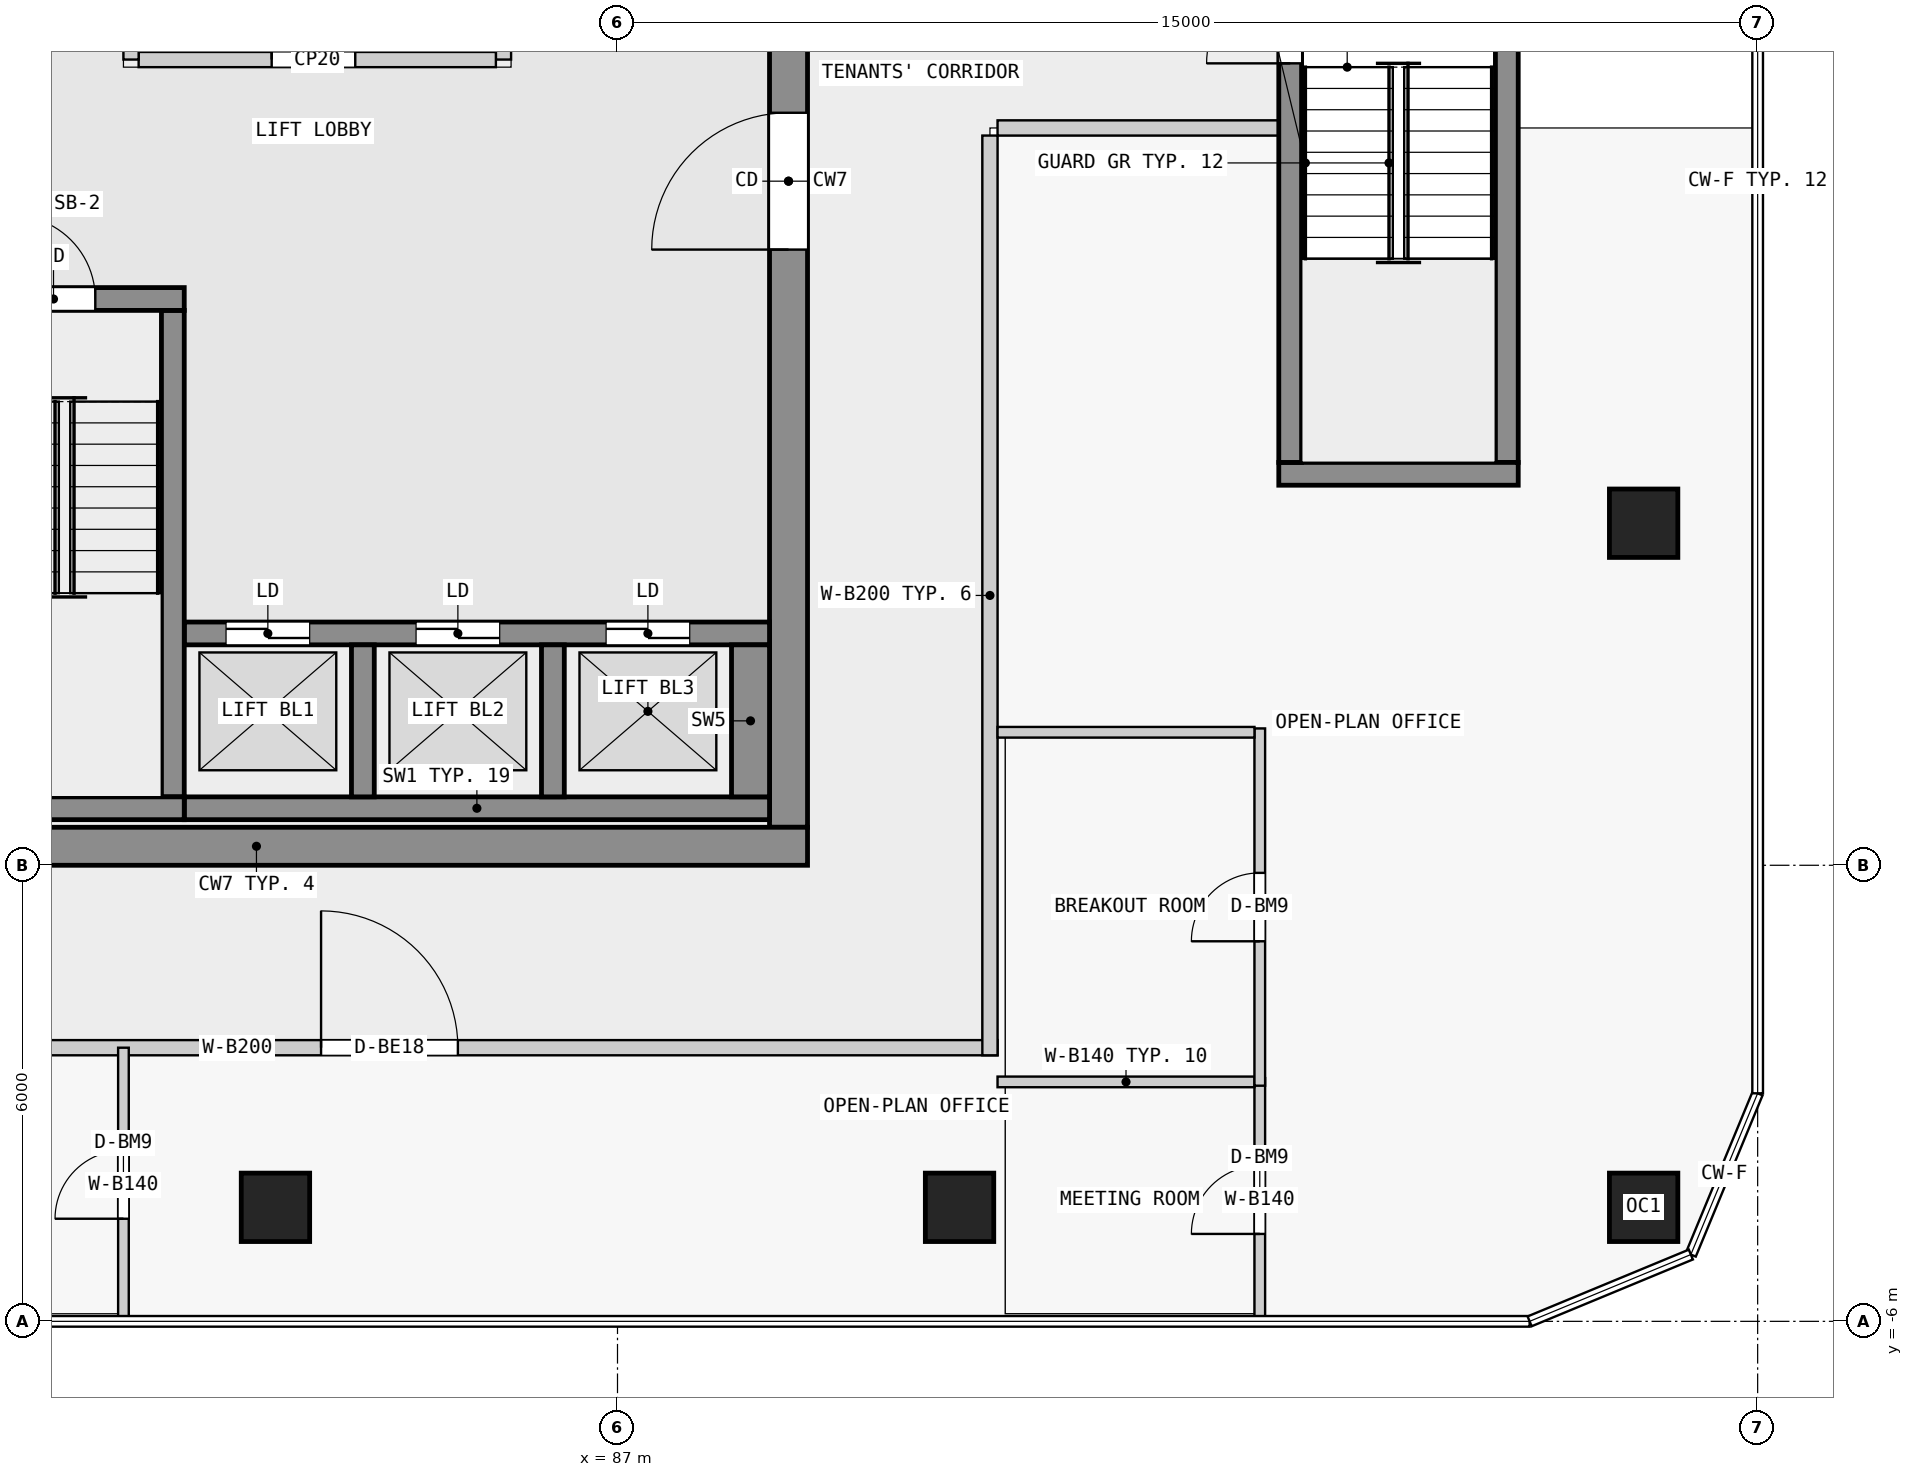
"""IFC4 building model, lengths in metres.
Left out: names, types, materials, properties, quantities, classifications, styles, units other than length and angle.
Written with IfcOpenShell. Run it as: python <this file> out.ifc"""

import sys

from ifc_helpers import new_model, si_unit, direction, frame, frame_2d, origin, origin_2d, place, context, subcontext, project, spatial, rectangle, extrude, element, fill, save


model = new_model("IFC4")
c1 = context("Model", 3, precision=1e-05, world=origin(), true_north=direction((0.0, 1.0)))
c2 = subcontext(c1, "Body", "Model", "MODEL_VIEW")
j1 = project(units=[si_unit("LENGTHUNIT", "METRE"), si_unit("PLANEANGLEUNIT", "RADIAN")], contexts=[c1])
p1 = place(None, origin())
s1 = spatial("IfcSite", under=j1, at=p1, CompositionType="ELEMENT")
p2 = place(p1, origin())
s2 = spatial("IfcBuilding", under=s1, at=p2, CompositionType="ELEMENT")
p3 = place(p2, frame((0.0, 0.0, 44.3)))
s3 = spatial("IfcBuildingStorey", under=s2, at=p3, CompositionType="ELEMENT", Elevation=44.3)
for number, where, z_axis, x_axis in (
    (1, (82.5, -4.5, 0.0), (0.0, 0.0, 1.0), (1.0, 0.0, 0.0)),
    (2, (91.5, -4.5, 0.0), (0.0, 0.0, 1.0), (1.0, 0.0, 0.0)),
    (3, (100.5, -4.5, 0.0), (0.0, 0.0, 1.0), (1.0, 0.0, 0.0)),
    (4, (100.5, 4.5, 0.0), (0.0, 0.0, 1.0), (1.0, 0.0, 0.0)),
):
    element("IfcColumn", number, at=place(p3, frame(where, z_axis=z_axis, x_axis=x_axis)), inside=s3, PredefinedType="COLUMN", context=c2, shape_type="SweptSolid", body=[
        extrude(rectangle(XDim=0.9, YDim=0.9, at=origin_2d()), origin(), (0.0, 0.0, 1.0), 3.5),
    ])
p4 = place(p3, frame((75.0, 0.25, 0.0), z_axis=(0.0, 0.0, 1.0), x_axis=(1.0, 0.0, 0.0)))
e5 = element("IfcWall", 5, at=p4, inside=s3, PredefinedType="SHEAR", context=c2, shape_type="SweptSolid", body=[
    extrude(rectangle(XDim=14.5, YDim=0.5, at=frame_2d((7.25, 0.0))), origin(), (0.0, 0.0, 1.0), 3.25),
])
p5 = place(p3, frame((89.25, 0.5, 0.0), z_axis=(0.0, 0.0, 1.0), x_axis=(0.0, 1.0, 0.0)))
e6 = element("IfcWall", 6, at=p5, inside=s3, PredefinedType="SHEAR", context=c2, shape_type="SweptSolid", body=[
    extrude(rectangle(XDim=17.0, YDim=0.5, at=frame_2d((8.5, 0.0))), origin(), (0.0, 0.0, 1.0), 3.25),
])
p6 = place(p5, frame((7.6, 0.0, 0.0)))
e7 = element("IfcOpeningElement", 7, at=p6, cuts=e6, PredefinedType="OPENING", context=c2, shape_type="SweptSolid", body=[
    extrude(rectangle(XDim=1.8, YDim=2.1, at=frame_2d((0.9, 1.05))), frame((0.0, 0.26, 0.0), z_axis=(0.0, -1.0, 0.0), x_axis=(1.0, 0.0, 0.0)), (0.0, 0.0, 1.0), 0.52),
])
p7 = place(p3, frame((75.48, 0.75, 0.0), z_axis=(0.0, 0.0, 1.0), x_axis=(1.0, 0.0, 0.0)))
e8 = element("IfcWall", 8, at=p7, inside=s3, PredefinedType="SHEAR", context=c2, shape_type="SweptSolid", body=[
    extrude(rectangle(XDim=5.82, YDim=0.3, at=frame_2d((2.91, 0.0))), origin(), (0.0, 0.0, 1.0), 3.25),
])
p8 = place(p3, frame((75.48, 7.45, 0.0), z_axis=(0.0, 0.0, 1.0), x_axis=(1.0, 0.0, 0.0)))
e9 = element("IfcWall", 9, at=p8, inside=s3, PredefinedType="SHEAR", context=c2, shape_type="SweptSolid", body=[
    extrude(rectangle(XDim=5.82, YDim=0.3, at=frame_2d((2.91, 0.0))), origin(), (0.0, 0.0, 1.0), 3.25),
])
p9 = place(p8, frame((0.75, 0.0, 0.0)))
e10 = element("IfcOpeningElement", 10, at=p9, cuts=e9, PredefinedType="OPENING", context=c2, shape_type="SweptSolid", body=[
    extrude(rectangle(XDim=1.1, YDim=2.1, at=frame_2d((0.55, 1.05))), frame((0.0, 0.16, 0.0), z_axis=(0.0, -1.0, 0.0), x_axis=(1.0, 0.0, 0.0)), (0.0, 0.0, 1.0), 0.32),
])
p10 = place(p8, frame((3.55, 0.0, 0.0)))
e11 = element("IfcOpeningElement", 11, at=p10, cuts=e9, PredefinedType="OPENING", context=c2, shape_type="SweptSolid", body=[
    extrude(rectangle(XDim=1.1, YDim=2.1, at=frame_2d((0.55, 1.05))), frame((0.0, 0.16, 0.0), z_axis=(0.0, -1.0, 0.0), x_axis=(1.0, 0.0, 0.0)), (0.0, 0.0, 1.0), 0.32),
])
p11 = place(p3, frame((81.15, 0.9, 0.0), z_axis=(0.0, 0.0, 1.0), x_axis=(0.0, 1.0, 0.0)))
e12 = element("IfcWall", 12, at=p11, inside=s3, PredefinedType="SHEAR", context=c2, shape_type="SweptSolid", body=[
    extrude(rectangle(XDim=6.4, YDim=0.3, at=frame_2d((3.2, 0.0))), origin(), (0.0, 0.0, 1.0), 3.25),
])
p12 = place(p3, frame((81.3, 0.75, 0.0), z_axis=(0.0, 0.0, 1.0), x_axis=(1.0, 0.0, 0.0)))
e13 = element("IfcWall", 13, at=p12, inside=s3, PredefinedType="SHEAR", context=c2, shape_type="SweptSolid", body=[
    extrude(rectangle(XDim=7.7, YDim=0.3, at=frame_2d((3.85, 0.0))), origin(), (0.0, 0.0, 1.0), 3.25),
])
for number, where, z_axis, x_axis in (
    (14, (83.65, 0.9, 0.0), (0.0, 0.0, 1.0), (0.0, 1.0, 0.0)),
    (15, (86.15, 0.9, 0.0), (0.0, 0.0, 1.0), (0.0, 1.0, 0.0)),
):
    element("IfcWall", number, at=place(p3, frame(where, z_axis=z_axis, x_axis=x_axis)), inside=s3, PredefinedType="SHEAR", context=c2, shape_type="SweptSolid", body=[
        extrude(rectangle(XDim=2.0, YDim=0.3, at=frame_2d((1.0, 0.0))), origin(), (0.0, 0.0, 1.0), 3.25),
    ])
p13 = place(p3, frame((88.75, 0.9, 0.0), z_axis=(0.0, 0.0, 1.0), x_axis=(0.0, 1.0, 0.0)))
e16 = element("IfcWall", 16, at=p13, inside=s3, PredefinedType="SHEAR", context=c2, shape_type="SweptSolid", body=[
    extrude(rectangle(XDim=2.0, YDim=0.5, at=frame_2d((1.0, 0.0))), origin(), (0.0, 0.0, 1.0), 3.25),
])
p14 = place(p3, frame((81.3, 3.05, 0.0), z_axis=(0.0, 0.0, 1.0), x_axis=(1.0, 0.0, 0.0)))
e17 = element("IfcWall", 17, at=p14, inside=s3, PredefinedType="SHEAR", context=c2, shape_type="SweptSolid", body=[
    extrude(rectangle(XDim=7.7, YDim=0.3, at=frame_2d((3.85, 0.0))), origin(), (0.0, 0.0, 1.0), 3.25),
])
p15 = place(p14, frame((0.55, 0.0, 0.0)))
e18 = element("IfcOpeningElement", 18, at=p15, cuts=e17, PredefinedType="OPENING", context=c2, shape_type="SweptSolid", body=[
    extrude(rectangle(XDim=1.1, YDim=2.1, at=frame_2d((0.55, 1.05))), frame((0.0, 0.16, 0.0), z_axis=(0.0, -1.0, 0.0), x_axis=(1.0, 0.0, 0.0)), (0.0, 0.0, 1.0), 0.32),
])
p16 = place(p14, frame((3.05, 0.0, 0.0)))
e19 = element("IfcOpeningElement", 19, at=p16, cuts=e17, PredefinedType="OPENING", context=c2, shape_type="SweptSolid", body=[
    extrude(rectangle(XDim=1.1, YDim=2.1, at=frame_2d((0.55, 1.05))), frame((0.0, 0.16, 0.0), z_axis=(0.0, -1.0, 0.0), x_axis=(1.0, 0.0, 0.0)), (0.0, 0.0, 1.0), 0.32),
])
p17 = place(p14, frame((5.55, 0.0, 0.0)))
e20 = element("IfcOpeningElement", 20, at=p17, cuts=e17, PredefinedType="OPENING", context=c2, shape_type="SweptSolid", body=[
    extrude(rectangle(XDim=1.1, YDim=2.1, at=frame_2d((0.55, 1.05))), frame((0.0, 0.16, 0.0), z_axis=(0.0, -1.0, 0.0), x_axis=(1.0, 0.0, 0.0)), (0.0, 0.0, 1.0), 0.32),
])
p18 = place(p3, frame((95.85, 5.3, 0.0), z_axis=(0.0, 0.0, 1.0), x_axis=(0.0, 1.0, 0.0)))
e21 = element("IfcWall", 21, at=p18, inside=s3, PredefinedType="SHEAR", context=c2, shape_type="SweptSolid", body=[
    extrude(rectangle(XDim=6.4, YDim=0.3, at=frame_2d((3.2, 0.0))), origin(), (0.0, 0.0, 1.0), 3.25),
])
p19 = place(p18, frame((5.25, 0.0, 0.0)))
e22 = element("IfcOpeningElement", 22, at=p19, cuts=e21, PredefinedType="OPENING", context=c2, shape_type="SweptSolid", body=[
    extrude(rectangle(XDim=1.1, YDim=2.1, at=frame_2d((0.55, 1.05))), frame((0.0, 0.16, 0.0), z_axis=(0.0, -1.0, 0.0), x_axis=(1.0, 0.0, 0.0)), (0.0, 0.0, 1.0), 0.32),
])
p20 = place(p3, frame((98.7, 5.3, 0.0), z_axis=(0.0, 0.0, 1.0), x_axis=(0.0, 1.0, 0.0)))
e23 = element("IfcWall", 23, at=p20, inside=s3, PredefinedType="SHEAR", context=c2, shape_type="SweptSolid", body=[
    extrude(rectangle(XDim=6.4, YDim=0.3, at=frame_2d((3.2, 0.0))), origin(), (0.0, 0.0, 1.0), 3.25),
])
p21 = place(p3, frame((95.7, 5.15, 0.0), z_axis=(0.0, 0.0, 1.0), x_axis=(1.0, 0.0, 0.0)))
e24 = element("IfcWall", 24, at=p21, inside=s3, PredefinedType="SHEAR", context=c2, shape_type="SweptSolid", body=[
    extrude(rectangle(XDim=3.15, YDim=0.3, at=frame_2d((1.575, 0.0))), origin(), (0.0, 0.0, 1.0), 3.25),
])
p22 = place(p3, frame((80.6, 10.6, 0.0), z_axis=(0.0, 0.0, 1.0), x_axis=(0.0, 1.0, 0.0)))
e25 = element("IfcWall", 25, at=p22, inside=s3, PredefinedType="PARTITIONING", context=c2, shape_type="SweptSolid", body=[
    extrude(rectangle(XDim=3.4, YDim=0.2, at=frame_2d((1.7, 0.0))), origin(), (0.0, 0.0, 1.0), 3.25),
])
p23 = place(p3, frame((80.7, 10.6, 0.0), z_axis=(0.0, 0.0, 1.0), x_axis=(1.0, 0.0, 0.0)))
e26 = element("IfcWall", 26, at=p23, inside=s3, PredefinedType="PARTITIONING", context=c2, shape_type="SweptSolid", body=[
    extrude(rectangle(XDim=4.7, YDim=0.2, at=frame_2d((2.35, 0.0))), origin(), (0.0, 0.0, 1.0), 3.25),
])
p24 = place(p23, frame((1.75, 0.0, 0.0)))
e27 = element("IfcOpeningElement", 27, at=p24, cuts=e26, PredefinedType="OPENING", context=c2, shape_type="SweptSolid", body=[
    extrude(rectangle(XDim=1.1, YDim=2.1, at=frame_2d((0.55, 1.05))), frame((0.0, 0.11, 0.0), z_axis=(0.0, -1.0, 0.0), x_axis=(1.0, 0.0, 0.0)), (0.0, 0.0, 1.0), 0.22),
])
p25 = place(p3, frame((85.5, 10.6, 0.0), z_axis=(0.0, 0.0, 1.0), x_axis=(0.0, 1.0, 0.0)))
e28 = element("IfcWall", 28, at=p25, inside=s3, PredefinedType="PARTITIONING", context=c2, shape_type="SweptSolid", body=[
    extrude(rectangle(XDim=3.4, YDim=0.2, at=frame_2d((1.7, 0.0))), origin(), (0.0, 0.0, 1.0), 3.25),
])
p26 = place(p3, frame((72.0, -2.4, 0.0), z_axis=(0.0, 0.0, 1.0), x_axis=(1.0, 0.0, 0.0)))
e29 = element("IfcWall", 29, at=p26, inside=s3, PredefinedType="PARTITIONING", context=c2, shape_type="SweptSolid", body=[
    extrude(rectangle(XDim=20.0, YDim=0.2, at=frame_2d((10.0, 0.0))), origin(), (0.0, 0.0, 1.0), 3.25),
])
p27 = place(p26, frame((11.1, 0.0, 0.0)))
e30 = element("IfcOpeningElement", 30, at=p27, cuts=e29, PredefinedType="OPENING", context=c2, shape_type="SweptSolid", body=[
    extrude(rectangle(XDim=1.8, YDim=2.1, at=frame_2d((0.9, 1.05))), frame((0.0, 0.11, 0.0), z_axis=(0.0, -1.0, 0.0), x_axis=(1.0, 0.0, 0.0)), (0.0, 0.0, 1.0), 0.22),
])
p28 = place(p3, frame((91.9, -2.5, 0.0), z_axis=(0.0, 0.0, 1.0), x_axis=(0.0, 1.0, 0.0)))
e31 = element("IfcWall", 31, at=p28, inside=s3, PredefinedType="PARTITIONING", context=c2, shape_type="SweptSolid", body=[
    extrude(rectangle(XDim=12.1, YDim=0.2, at=frame_2d((6.05, 0.0))), origin(), (0.0, 0.0, 1.0), 3.25),
])
p29 = place(p3, frame((92.0, 9.7, 0.0), z_axis=(0.0, 0.0, 1.0), x_axis=(1.0, 0.0, 0.0)))
e32 = element("IfcWall", 32, at=p29, inside=s3, PredefinedType="PARTITIONING", context=c2, shape_type="SweptSolid", body=[
    extrude(rectangle(XDim=3.7, YDim=0.2, at=frame_2d((1.85, 0.0))), origin(), (0.0, 0.0, 1.0), 3.25),
])
p30 = place(p3, frame((80.5, -6.0, 0.0), z_axis=(0.0, 0.0, 1.0), x_axis=(0.0, 1.0, 0.0)))
e33 = element("IfcWall", 33, at=p30, inside=s3, PredefinedType="PARTITIONING", context=c2, shape_type="SweptSolid", body=[
    extrude(rectangle(XDim=3.6, YDim=0.14, at=frame_2d((1.8, 0.0))), origin(), (0.0, 0.0, 1.0), 3.25),
])
p31 = place(p30, frame((1.35, 0.0, 0.0)))
e34 = element("IfcOpeningElement", 34, at=p31, cuts=e33, PredefinedType="OPENING", context=c2, shape_type="SweptSolid", body=[
    extrude(rectangle(XDim=0.9, YDim=2.4, at=frame_2d((0.45, 1.2))), frame((0.0, 0.08, 0.0), z_axis=(0.0, -1.0, 0.0), x_axis=(1.0, 0.0, 0.0)), (0.0, 0.0, 1.0), 0.16),
])
p32 = place(p3, frame((95.45, -6.0, 0.0), z_axis=(0.0, 0.0, 1.0), x_axis=(0.0, 1.0, 0.0)))
e35 = element("IfcWall", 35, at=p32, inside=s3, PredefinedType="PARTITIONING", context=c2, shape_type="SweptSolid", body=[
    extrude(rectangle(XDim=3.2, YDim=0.14, at=frame_2d((1.6, 0.0))), origin(), (0.0, 0.0, 1.0), 3.25),
])
p33 = place(p32, frame((1.15, 0.0, 0.0)))
e36 = element("IfcOpeningElement", 36, at=p33, cuts=e35, PredefinedType="OPENING", context=c2, shape_type="SweptSolid", body=[
    extrude(rectangle(XDim=0.9, YDim=2.4, at=frame_2d((0.45, 1.2))), frame((0.0, 0.08, 0.0), z_axis=(0.0, -1.0, 0.0), x_axis=(1.0, 0.0, 0.0)), (0.0, 0.0, 1.0), 0.16),
])
p34 = place(p3, frame((92.0, -2.85, 0.0), z_axis=(0.0, 0.0, 1.0), x_axis=(1.0, 0.0, 0.0)))
e37 = element("IfcWall", 37, at=p34, inside=s3, PredefinedType="PARTITIONING", context=c2, shape_type="SweptSolid", body=[
    extrude(rectangle(XDim=3.38, YDim=0.14, at=frame_2d((1.69, 0.0))), origin(), (0.0, 0.0, 1.0), 3.25),
])
p35 = place(p3, frame((95.45, -2.9, 0.0), z_axis=(0.0, 0.0, 1.0), x_axis=(0.0, 1.0, 0.0)))
e38 = element("IfcWall", 38, at=p35, inside=s3, PredefinedType="PARTITIONING", context=c2, shape_type="SweptSolid", body=[
    extrude(rectangle(XDim=4.7, YDim=0.14, at=frame_2d((2.35, 0.0))), origin(), (0.0, 0.0, 1.0), 3.25),
])
p36 = place(p35, frame((1.9, 0.0, 0.0)))
e39 = element("IfcOpeningElement", 39, at=p36, cuts=e38, PredefinedType="OPENING", context=c2, shape_type="SweptSolid", body=[
    extrude(rectangle(XDim=0.9, YDim=2.4, at=frame_2d((0.45, 1.2))), frame((0.0, 0.08, 0.0), z_axis=(0.0, -1.0, 0.0), x_axis=(1.0, 0.0, 0.0)), (0.0, 0.0, 1.0), 0.16),
])
p37 = place(p3, frame((92.0, 1.75, 0.0), z_axis=(0.0, 0.0, 1.0), x_axis=(1.0, 0.0, 0.0)))
e40 = element("IfcWall", 40, at=p37, inside=s3, PredefinedType="PARTITIONING", context=c2, shape_type="SweptSolid", body=[
    extrude(rectangle(XDim=3.38, YDim=0.14, at=frame_2d((1.69, 0.0))), origin(), (0.0, 0.0, 1.0), 3.25),
])
p38 = place(p24, origin())
e41 = element("IfcDoor", 41, at=p38, inside=s3, OperationType="SINGLE_SWING_LEFT", PredefinedType="DOOR", context=c2, shape_type="SweptSolid", body=[
    extrude(rectangle(XDim=1.1, YDim=2.1, at=frame_2d((0.55, 1.05))), frame((0.0, 0.025, 0.0), z_axis=(0.0, -1.0, 0.0), x_axis=(1.0, 0.0, 0.0)), (0.0, 0.0, 1.0), 0.05),
])
fill(e27, e41)
p39 = place(p15, origin())
e42 = element("IfcDoor", 42, at=p39, inside=s3, OperationType="DOUBLE_DOOR_SLIDING", PredefinedType="DOOR", context=c2, shape_type="SweptSolid", body=[
    extrude(rectangle(XDim=1.1, YDim=2.1, at=frame_2d((0.55, 1.05))), frame((0.0, 0.025, 0.0), z_axis=(0.0, -1.0, 0.0), x_axis=(1.0, 0.0, 0.0)), (0.0, 0.0, 1.0), 0.05),
])
fill(e18, e42)
p40 = place(p16, origin())
e43 = element("IfcDoor", 43, at=p40, inside=s3, OperationType="DOUBLE_DOOR_SLIDING", PredefinedType="DOOR", context=c2, shape_type="SweptSolid", body=[
    extrude(rectangle(XDim=1.1, YDim=2.1, at=frame_2d((0.55, 1.05))), frame((0.0, 0.025, 0.0), z_axis=(0.0, -1.0, 0.0), x_axis=(1.0, 0.0, 0.0)), (0.0, 0.0, 1.0), 0.05),
])
fill(e19, e43)
p41 = place(p17, origin())
e44 = element("IfcDoor", 44, at=p41, inside=s3, OperationType="DOUBLE_DOOR_SLIDING", PredefinedType="DOOR", context=c2, shape_type="SweptSolid", body=[
    extrude(rectangle(XDim=1.1, YDim=2.1, at=frame_2d((0.55, 1.05))), frame((0.0, 0.025, 0.0), z_axis=(0.0, -1.0, 0.0), x_axis=(1.0, 0.0, 0.0)), (0.0, 0.0, 1.0), 0.05),
])
fill(e20, e44)
p42 = place(p10, origin())
e45 = element("IfcDoor", 45, at=p42, inside=s3, OperationType="SINGLE_SWING_LEFT", PredefinedType="DOOR", context=c2, shape_type="SweptSolid", body=[
    extrude(rectangle(XDim=1.1, YDim=2.1, at=frame_2d((0.55, 1.05))), frame((0.0, 0.025, 0.0), z_axis=(0.0, -1.0, 0.0), x_axis=(1.0, 0.0, 0.0)), (0.0, 0.0, 1.0), 0.05),
])
fill(e11, e45)
p43 = place(p19, origin())
e46 = element("IfcDoor", 46, at=p43, inside=s3, OperationType="SINGLE_SWING_LEFT", PredefinedType="DOOR", context=c2, shape_type="SweptSolid", body=[
    extrude(rectangle(XDim=1.1, YDim=2.1, at=frame_2d((0.55, 1.05))), frame((0.0, 0.025, 0.0), z_axis=(0.0, -1.0, 0.0), x_axis=(1.0, 0.0, 0.0)), (0.0, 0.0, 1.0), 0.05),
])
fill(e22, e46)
p44 = place(p6, origin())
e47 = element("IfcDoor", 47, at=p44, inside=s3, OperationType="DOUBLE_DOOR_SINGLE_SWING", PredefinedType="DOOR", context=c2, shape_type="SweptSolid", body=[
    extrude(rectangle(XDim=1.8, YDim=2.1, at=frame_2d((0.9, 1.05))), frame((0.0, 0.025, 0.0), z_axis=(0.0, -1.0, 0.0), x_axis=(1.0, 0.0, 0.0)), (0.0, 0.0, 1.0), 0.05),
])
fill(e7, e47)
p45 = place(p27, origin())
e48 = element("IfcDoor", 48, at=p45, inside=s3, OperationType="DOUBLE_DOOR_SINGLE_SWING", PredefinedType="DOOR", context=c2, shape_type="SweptSolid", body=[
    extrude(rectangle(XDim=1.8, YDim=2.1, at=frame_2d((0.9, 1.05))), frame((0.0, 0.025, 0.0), z_axis=(0.0, -1.0, 0.0), x_axis=(1.0, 0.0, 0.0)), (0.0, 0.0, 1.0), 0.05),
])
fill(e30, e48)
p46 = place(p31, origin())
e49 = element("IfcDoor", 49, at=p46, inside=s3, OperationType="SINGLE_SWING_LEFT", PredefinedType="DOOR", context=c2, shape_type="SweptSolid", body=[
    extrude(rectangle(XDim=0.9, YDim=2.4, at=frame_2d((0.45, 1.2))), frame((0.0, 0.025, 0.0), z_axis=(0.0, -1.0, 0.0), x_axis=(1.0, 0.0, 0.0)), (0.0, 0.0, 1.0), 0.05),
])
fill(e34, e49)
p47 = place(p33, origin())
e50 = element("IfcDoor", 50, at=p47, inside=s3, OperationType="SINGLE_SWING_LEFT", PredefinedType="DOOR", context=c2, shape_type="SweptSolid", body=[
    extrude(rectangle(XDim=0.9, YDim=2.4, at=frame_2d((0.45, 1.2))), frame((0.0, 0.025, 0.0), z_axis=(0.0, -1.0, 0.0), x_axis=(1.0, 0.0, 0.0)), (0.0, 0.0, 1.0), 0.05),
])
fill(e36, e50)
p48 = place(p36, origin())
e51 = element("IfcDoor", 51, at=p48, inside=s3, OperationType="SINGLE_SWING_LEFT", PredefinedType="DOOR", context=c2, shape_type="SweptSolid", body=[
    extrude(rectangle(XDim=0.9, YDim=2.4, at=frame_2d((0.45, 1.2))), frame((0.0, 0.025, 0.0), z_axis=(0.0, -1.0, 0.0), x_axis=(1.0, 0.0, 0.0)), (0.0, 0.0, 1.0), 0.05),
])
fill(e39, e51)
save(model, sys.argv[1])
